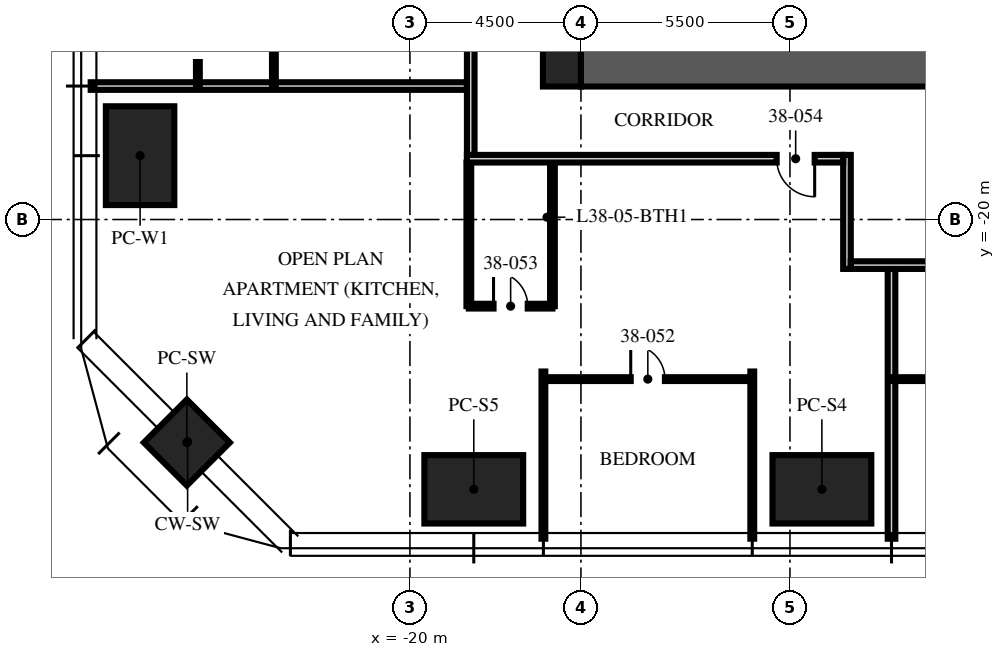
"""IFC4 building model, lengths in metres.
Left out: names, types, materials, properties, quantities, classifications, styles, units other than length and angle.
Written with IfcOpenShell. Run it as: python <this file> out.ifc"""

import sys

from ifc_helpers import new_model, si_unit, direction, frame, frame_2d, origin, origin_2d, place, context, subcontext, project, spatial, rectangle, extrude, element, fill, save


model = new_model("IFC4")
c1 = context("Model", 3, precision=1e-05, world=origin(), true_north=direction((0.0, 1.0)))
c2 = subcontext(c1, "Body", "Model", "MODEL_VIEW")
j1 = project(units=[si_unit("LENGTHUNIT", "METRE"), si_unit("PLANEANGLEUNIT", "RADIAN")], contexts=[c1])
p1 = place(None, origin())
s1 = spatial("IfcSite", under=j1, at=p1, CompositionType="ELEMENT")
p2 = place(p1, origin())
s2 = spatial("IfcBuilding", under=s1, at=p2, CompositionType="ELEMENT")
p3 = place(p2, frame((0.0, 0.0, 152.25)))
s3 = spatial("IfcBuildingStorey", under=s2, at=p3, CompositionType="ELEMENT", Elevation=152.25)
p4 = place(p3, frame((-15.5, -15.5, -0.25), z_axis=(0.0, 0.0, 1.0), x_axis=(1.0, 0.0, 0.0)))
e1 = element("IfcWall", 1, at=p4, inside=s3, PredefinedType="SHEAR", context=c2, shape_type="SweptSolid", body=[
    extrude(rectangle(XDim=31.0, YDim=2.0, at=frame_2d((15.5, 0.0))), origin(), (0.0, 0.0, 1.0), 3.75),
])
p5 = place(p4, frame((10.4, 0.0, 0.25)))
e2 = element("IfcOpeningElement", 2, at=p5, cuts=e1, PredefinedType="OPENING", context=c2, shape_type="SweptSolid", body=[
    extrude(rectangle(XDim=1.1, YDim=2.1, at=frame_2d((0.55, 1.05))), frame((0.0, 1.01, 0.0), z_axis=(0.0, -1.0, 0.0), x_axis=(1.0, 0.0, 0.0)), (0.0, 0.0, 1.0), 2.02),
])
p6 = place(p4, frame((13.5, 0.0, 0.25)))
e3 = element("IfcOpeningElement", 3, at=p6, cuts=e1, PredefinedType="OPENING", context=c2, shape_type="SweptSolid", body=[
    extrude(rectangle(XDim=1.1, YDim=2.1, at=frame_2d((0.55, 1.05))), frame((0.0, 1.01, 0.0), z_axis=(0.0, -1.0, 0.0), x_axis=(1.0, 0.0, 0.0)), (0.0, 0.0, 1.0), 2.02),
])
p7 = place(p4, frame((16.6, 0.0, 0.25)))
e4 = element("IfcOpeningElement", 4, at=p7, cuts=e1, PredefinedType="OPENING", context=c2, shape_type="SweptSolid", body=[
    extrude(rectangle(XDim=1.1, YDim=2.1, at=frame_2d((0.55, 1.05))), frame((0.0, 1.01, 0.0), z_axis=(0.0, -1.0, 0.0), x_axis=(1.0, 0.0, 0.0)), (0.0, 0.0, 1.0), 2.02),
])
p8 = place(p3, frame((-16.0, -16.0, -0.25), z_axis=(0.0, 0.0, 1.0), x_axis=(1.0, 0.0, 0.0)))
e5 = element("IfcColumn", 5, at=p8, inside=s3, PredefinedType="COLUMN", context=c2, shape_type="SweptSolid", body=[
    extrude(rectangle(XDim=1.0, YDim=1.0, at=origin_2d()), origin(), (0.0, 0.0, 1.0), 3.75),
])
for number, where, z_axis, x_axis in (
    (6, (-9.16, -27.1, 0.0), (0.0, 0.0, 1.0), (1.0, 0.0, 0.0)),
    (7, (-18.32, -27.1, 0.0), (0.0, 0.0, 1.0), (1.0, 0.0, 0.0)),
    (8, (-27.1, -18.32, 0.0), (0.0, 0.0, 1.0), (0.0, 1.0, 0.0)),
):
    element("IfcColumn", number, at=place(p3, frame(where, z_axis=z_axis, x_axis=x_axis)), inside=s3, PredefinedType="COLUMN", context=c2, shape_type="SweptSolid", body=[
        extrude(rectangle(XDim=2.6, YDim=1.8, at=origin_2d()), origin(), (0.0, 0.0, 1.0), 3.75),
    ])
p9 = place(p3, frame((-25.87, -25.87, 0.0), z_axis=(0.0, 0.0, 1.0), x_axis=(0.707106781187, -0.707106781187, 0.0)))
e9 = element("IfcColumn", 9, at=p9, inside=s3, PredefinedType="COLUMN", context=c2, shape_type="SweptSolid", body=[
    extrude(rectangle(XDim=1.6, YDim=1.6, at=origin_2d()), origin(), (0.0, 0.0, 1.0), 3.75),
])
p10 = place(p3, frame((-18.5, -16.488, 0.0), z_axis=(0.0, 0.0, 1.0), x_axis=(-1.0, 0.0, 0.0)))
e10 = element("IfcWall", 10, at=p10, inside=s3, PredefinedType="PARTITIONING", context=c2, shape_type="SweptSolid", body=[
    extrude(rectangle(XDim=9.9, YDim=0.2, at=frame_2d((4.95, 0.0))), origin(), (0.0, 0.0, 1.0), 2.81),
])
for number, where, z_axis, x_axis in (
    (11, (-16.488, -24.0, 0.0), (0.0, 0.0, 1.0), (0.0, -1.0, 0.0)),
    (12, (-10.992, -24.0, 0.0), (0.0, 0.0, 1.0), (0.0, -1.0, 0.0)),
):
    element("IfcWall", number, at=place(p3, frame(where, z_axis=z_axis, x_axis=x_axis)), inside=s3, PredefinedType="PARTITIONING", context=c2, shape_type="SweptSolid", body=[
        extrude(rectangle(XDim=4.4, YDim=0.1, at=frame_2d((2.2, 0.0))), origin(), (0.0, 0.0, 1.0), 2.81),
    ])
p11 = place(p3, frame((-7.328, -21.3, 0.0), z_axis=(0.0, 0.0, 1.0), x_axis=(0.0, -1.0, 0.0)))
e13 = element("IfcWall", 13, at=p11, inside=s3, PredefinedType="PARTITIONING", context=c2, shape_type="SweptSolid", body=[
    extrude(rectangle(XDim=7.1, YDim=0.2, at=frame_2d((3.55, 0.0))), origin(), (0.0, 0.0, 1.0), 2.81),
])
p12 = place(p3, frame((-25.58, -10.992, 0.0), z_axis=(0.0, 0.0, 1.0), x_axis=(0.0, -1.0, 0.0)))
e14 = element("IfcWall", 14, at=p12, inside=s3, PredefinedType="PARTITIONING", context=c2, shape_type="SweptSolid", body=[
    extrude(rectangle(XDim=5.496, YDim=0.1, at=frame_2d((2.748, 0.0))), origin(), (0.0, 0.0, 1.0), 2.81),
])
p13 = place(p12, frame((0.15, 0.0, 0.0)))
e15 = element("IfcOpeningElement", 15, at=p13, cuts=e14, PredefinedType="OPENING", context=c2, shape_type="SweptSolid", body=[
    extrude(rectangle(XDim=0.9, YDim=2.1, at=frame_2d((0.45, 1.05))), frame((0.0, 0.06, 0.0), z_axis=(0.0, -1.0, 0.0), x_axis=(1.0, 0.0, 0.0)), (0.0, 0.0, 1.0), 0.12),
])
p14 = place(p12, frame((2.898, 0.0, 0.0)))
e16 = element("IfcOpeningElement", 16, at=p14, cuts=e14, PredefinedType="OPENING", context=c2, shape_type="SweptSolid", body=[
    extrude(rectangle(XDim=0.9, YDim=2.1, at=frame_2d((0.45, 1.05))), frame((0.0, 0.06, 0.0), z_axis=(0.0, -1.0, 0.0), x_axis=(1.0, 0.0, 0.0)), (0.0, 0.0, 1.0), 0.12),
])
p15 = place(p3, frame((-23.58, -12.192, 0.0), z_axis=(0.0, 0.0, 1.0), x_axis=(0.0, -1.0, 0.0)))
e17 = element("IfcWall", 17, at=p15, inside=s3, PredefinedType="PARTITIONING", context=c2, shape_type="SweptSolid", body=[
    extrude(rectangle(XDim=4.296, YDim=0.1, at=frame_2d((2.148, 0.0))), origin(), (0.0, 0.0, 1.0), 2.81),
])
p16 = place(p3, frame((-16.488, -24.2, 0.0), z_axis=(0.0, 0.0, 1.0), x_axis=(1.0, 0.0, 0.0)))
e18 = element("IfcWall", 18, at=p16, inside=s3, PredefinedType="PARTITIONING", context=c2, shape_type="SweptSolid", body=[
    extrude(rectangle(XDim=5.496, YDim=0.1, at=frame_2d((2.748, 0.0))), origin(), (0.0, 0.0, 1.0), 2.81),
])
p17 = place(p16, frame((2.298, 0.0, 0.0)))
e19 = element("IfcOpeningElement", 19, at=p17, cuts=e18, PredefinedType="OPENING", context=c2, shape_type="SweptSolid", body=[
    extrude(rectangle(XDim=0.9, YDim=2.1, at=frame_2d((0.45, 1.05))), frame((0.0, 0.06, 0.0), z_axis=(0.0, -1.0, 0.0), x_axis=(1.0, 0.0, 0.0)), (0.0, 0.0, 1.0), 0.12),
])
p18 = place(p3, frame((-18.45, -22.28, 0.0), z_axis=(0.0, 0.0, 1.0), x_axis=(1.0, 0.0, 0.0)))
e20 = element("IfcWall", 20, at=p18, inside=s3, PredefinedType="PARTITIONING", context=c2, shape_type="SweptSolid", body=[
    extrude(rectangle(XDim=2.2, YDim=0.125, at=frame_2d((1.1, 0.0))), origin(), (0.0, 0.0, 1.0), 2.7),
])
p19 = place(p18, frame((0.65, 0.0, 0.0)))
e21 = element("IfcOpeningElement", 21, at=p19, cuts=e20, PredefinedType="OPENING", context=c2, shape_type="SweptSolid", body=[
    extrude(rectangle(XDim=0.9, YDim=2.1, at=frame_2d((0.45, 1.05))), frame((0.0, 0.073, 0.0), z_axis=(0.0, -1.0, 0.0), x_axis=(1.0, 0.0, 0.0)), (0.0, 0.0, 1.0), 0.145),
])
p20 = place(p3, frame((-18.45, -18.5, 0.0), z_axis=(0.0, 0.0, 1.0), x_axis=(0.0, -1.0, 0.0)))
e22 = element("IfcWall", 22, at=p20, inside=s3, PredefinedType="PARTITIONING", context=c2, shape_type="SweptSolid", body=[
    extrude(rectangle(XDim=3.78, YDim=0.125, at=frame_2d((1.89, 0.0))), origin(), (0.0, 0.0, 1.0), 2.3),
])
p21 = place(p3, frame((-16.25, -18.5, 0.0), z_axis=(0.0, 0.0, 1.0), x_axis=(0.0, -1.0, 0.0)))
e23 = element("IfcWall", 23, at=p21, inside=s3, PredefinedType="PARTITIONING", context=c2, shape_type="SweptSolid", body=[
    extrude(rectangle(XDim=3.78, YDim=0.125, at=frame_2d((1.89, 0.0))), origin(), (0.0, 0.0, 1.0), 3.5),
])
p22 = place(p3, frame((-7.328, -24.2, 0.0), z_axis=(0.0, 0.0, 1.0), x_axis=(1.0, 0.0, 0.0)))
e24 = element("IfcWall", 24, at=p22, inside=s3, PredefinedType="PARTITIONING", context=c2, shape_type="SweptSolid", body=[
    extrude(rectangle(XDim=5.496, YDim=0.1, at=frame_2d((2.748, 0.0))), origin(), (0.0, 0.0, 1.0), 2.81),
])
p23 = place(p22, frame((2.298, 0.0, 0.0)))
e25 = element("IfcOpeningElement", 25, at=p23, cuts=e24, PredefinedType="OPENING", context=c2, shape_type="SweptSolid", body=[
    extrude(rectangle(XDim=0.9, YDim=2.1, at=frame_2d((0.45, 1.05))), frame((0.0, 0.06, 0.0), z_axis=(0.0, -1.0, 0.0), x_axis=(1.0, 0.0, 0.0)), (0.0, 0.0, 1.0), 0.12),
])
p24 = place(p3, frame((-18.4, 5.328, 0.0), z_axis=(0.0, 0.0, 1.0), x_axis=(0.0, -1.0, 0.0)))
e26 = element("IfcWall", 26, at=p24, inside=s3, PredefinedType="PARTITIONING", context=c2, shape_type="SweptSolid", body=[
    extrude(rectangle(XDim=23.628, YDim=0.2, at=frame_2d((11.814, 0.0))), origin(), (0.0, 0.0, 1.0), 2.3),
])
p25 = place(p3, frame((-8.5, -18.3, 0.0), z_axis=(0.0, 0.0, 1.0), x_axis=(0.0, -1.0, 0.0)))
e27 = element("IfcWall", 27, at=p25, inside=s3, PredefinedType="PARTITIONING", context=c2, shape_type="SweptSolid", body=[
    extrude(rectangle(XDim=3.0, YDim=0.2, at=frame_2d((1.5, 0.0))), origin(), (0.0, 0.0, 1.0), 3.5),
])
p26 = place(p3, frame((5.4, -21.2, 0.0), z_axis=(0.0, 0.0, 1.0), x_axis=(-1.0, 0.0, 0.0)))
e28 = element("IfcWall", 28, at=p26, inside=s3, PredefinedType="PARTITIONING", context=c2, shape_type="SweptSolid", body=[
    extrude(rectangle(XDim=13.8, YDim=0.2, at=frame_2d((6.9, 0.0))), origin(), (0.0, 0.0, 1.0), 2.7),
])
p27 = place(p26, frame((0.958, 0.0, 0.0)))
e29 = element("IfcOpeningElement", 29, at=p27, cuts=e28, PredefinedType="OPENING", context=c2, shape_type="SweptSolid", body=[
    extrude(rectangle(XDim=1.0, YDim=2.2, at=frame_2d((0.5, 1.1))), frame((0.0, 0.11, 0.0), z_axis=(0.0, -1.0, 0.0), x_axis=(1.0, 0.0, 0.0)), (0.0, 0.0, 1.0), 0.22),
])
p28 = place(p3, frame((-8.6, -18.4, 0.0), z_axis=(0.0, 0.0, 1.0), x_axis=(-1.0, 0.0, 0.0)))
e30 = element("IfcWall", 30, at=p28, inside=s3, PredefinedType="PARTITIONING", context=c2, shape_type="SweptSolid", body=[
    extrude(rectangle(XDim=9.9, YDim=0.2, at=frame_2d((4.95, 0.0))), origin(), (0.0, 0.0, 1.0), 2.3),
])
p29 = place(p28, frame((0.75, 0.0, 0.0)))
e31 = element("IfcOpeningElement", 31, at=p29, cuts=e30, PredefinedType="OPENING", context=c2, shape_type="SweptSolid", body=[
    extrude(rectangle(XDim=1.0, YDim=2.2, at=frame_2d((0.5, 1.1))), frame((0.0, 0.11, 0.0), z_axis=(0.0, -1.0, 0.0), x_axis=(1.0, 0.0, 0.0)), (0.0, 0.0, 1.0), 0.22),
])
p30 = place(p17, origin())
e32 = element("IfcDoor", 32, at=p30, inside=s3, OperationType="SINGLE_SWING_LEFT", PredefinedType="DOOR", context=c2, shape_type="SweptSolid", body=[
    extrude(rectangle(XDim=0.9, YDim=2.1, at=frame_2d((0.45, 1.05))), frame((0.0, 0.025, 0.0), z_axis=(0.0, -1.0, 0.0), x_axis=(1.0, 0.0, 0.0)), (0.0, 0.0, 1.0), 0.05),
])
fill(e19, e32)
p31 = place(p19, origin())
e33 = element("IfcDoor", 33, at=p31, inside=s3, OperationType="SINGLE_SWING_LEFT", PredefinedType="DOOR", context=c2, shape_type="SweptSolid", body=[
    extrude(rectangle(XDim=0.9, YDim=2.1, at=frame_2d((0.45, 1.05))), frame((0.0, 0.025, 0.0), z_axis=(0.0, -1.0, 0.0), x_axis=(1.0, 0.0, 0.0)), (0.0, 0.0, 1.0), 0.05),
])
fill(e21, e33)
p32 = place(p29, origin())
e34 = element("IfcDoor", 34, at=p32, inside=s3, OperationType="SINGLE_SWING_LEFT", PredefinedType="DOOR", context=c2, shape_type="SweptSolid", body=[
    extrude(rectangle(XDim=1.0, YDim=2.2, at=frame_2d((0.5, 1.1))), frame((0.0, 0.025, 0.0), z_axis=(0.0, -1.0, 0.0), x_axis=(1.0, 0.0, 0.0)), (0.0, 0.0, 1.0), 0.05),
])
fill(e31, e34)
save(model, sys.argv[1])
